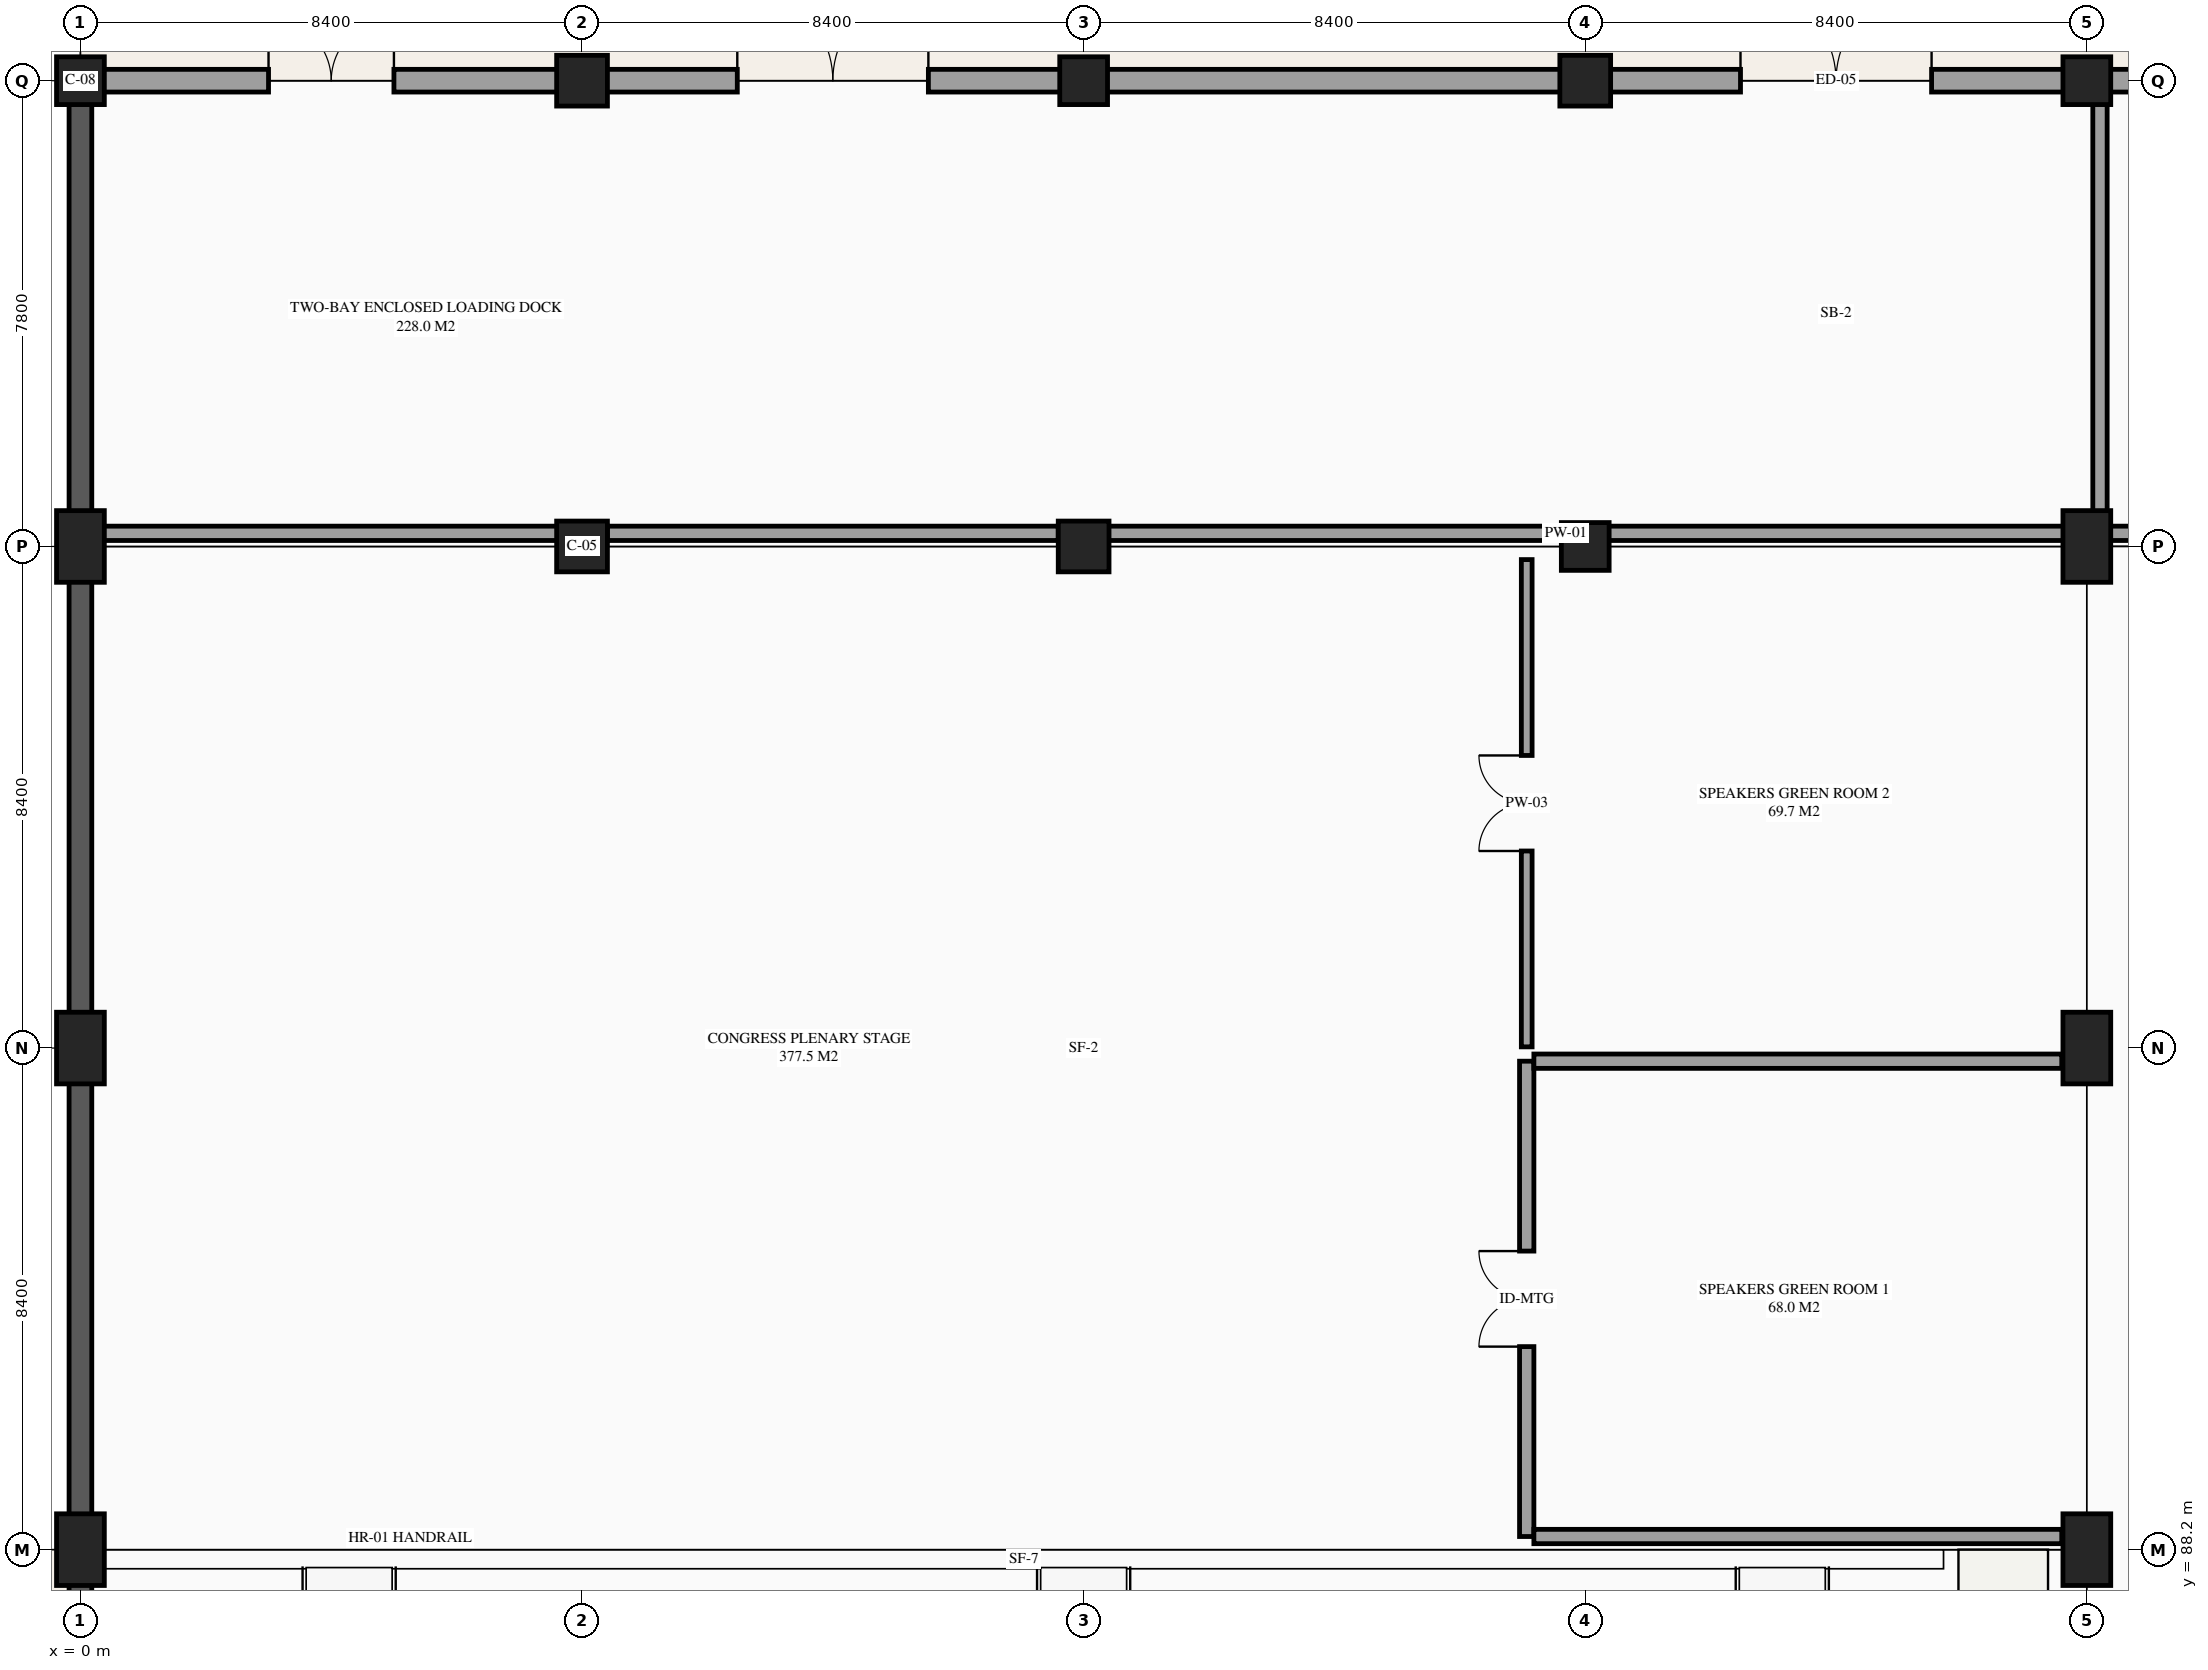
"""IFC4 building model, lengths in metres.
Left out: names, types, materials, properties, quantities, classifications, styles, units other than length and angle.
Written with IfcOpenShell. Run it as: python <this file> out.ifc"""

import sys

from ifc_helpers import new_model, si_unit, direction, frame, frame_2d, origin, origin_2d, place, context, subcontext, project, spatial, rectangle, extrude, element, fill, save


model = new_model("IFC4")
c1 = context("Model", 3, precision=1e-05, world=origin(), true_north=direction((0.0, 1.0)))
c2 = subcontext(c1, "Body", "Model", "MODEL_VIEW")
j1 = project(units=[si_unit("LENGTHUNIT", "METRE"), si_unit("PLANEANGLEUNIT", "RADIAN")], contexts=[c1])
p1 = place(None, origin())
s1 = spatial("IfcSite", under=j1, at=p1, CompositionType="ELEMENT")
p2 = place(p1, origin())
s2 = spatial("IfcBuilding", under=s1, at=p2, CompositionType="ELEMENT")
p3 = place(p2, origin())
s3 = spatial("IfcBuildingStorey", under=s2, at=p3, CompositionType="ELEMENT", Elevation=0.0)
for number, where, z_axis, x_axis in (
    (1, (0.0, 88.2, 0.0), (0.0, 0.0, 1.0), (1.0, 0.0, 0.0)),
    (2, (0.0, 96.6, 0.0), (0.0, 0.0, 1.0), (1.0, 0.0, 0.0)),
    (3, (0.0, 105.0, 0.0), (0.0, 0.0, 1.0), (1.0, 0.0, 0.0)),
):
    element("IfcColumn", number, at=place(p3, frame(where, z_axis=z_axis, x_axis=x_axis)), inside=s3, PredefinedType="COLUMN", context=c2, shape_type="SweptSolid", body=[
        extrude(rectangle(XDim=0.8, YDim=1.2, at=origin_2d()), origin(), (0.0, 0.0, 1.0), 5.4),
    ])
p4 = place(p3, frame((0.0, 112.8, 0.0), z_axis=(0.0, 0.0, 1.0), x_axis=(1.0, 0.0, 0.0)))
e4 = element("IfcColumn", 4, at=p4, inside=s3, PredefinedType="COLUMN", context=c2, shape_type="SweptSolid", body=[
    extrude(rectangle(XDim=0.8, YDim=0.8, at=origin_2d()), origin(), (0.0, 0.0, 1.0), 5.4),
])
for number, where, z_axis, x_axis in (
    (5, (8.4, 105.0, 0.0), (0.0, 0.0, 1.0), (1.0, 0.0, 0.0)),
    (6, (8.4, 112.8, 0.0), (0.0, 0.0, 1.0), (1.0, 0.0, 0.0)),
    (7, (16.8, 105.0, 0.0), (0.0, 0.0, 1.0), (1.0, 0.0, 0.0)),
):
    element("IfcColumn", number, at=place(p3, frame(where, z_axis=z_axis, x_axis=x_axis)), inside=s3, PredefinedType="COLUMN", context=c2, shape_type="SweptSolid", body=[
        extrude(rectangle(XDim=0.85, YDim=0.85, at=origin_2d()), origin(), (0.0, 0.0, 1.0), 5.4),
    ])
for number, where, z_axis, x_axis in (
    (8, (16.8, 112.8, 0.0), (0.0, 0.0, 1.0), (1.0, 0.0, 0.0)),
    (9, (25.2, 105.0, 0.0), (0.0, 0.0, 1.0), (1.0, 0.0, 0.0)),
):
    element("IfcColumn", number, at=place(p3, frame(where, z_axis=z_axis, x_axis=x_axis)), inside=s3, PredefinedType="COLUMN", context=c2, shape_type="SweptSolid", body=[
        extrude(rectangle(XDim=0.8, YDim=0.8, at=origin_2d()), origin(), (0.0, 0.0, 1.0), 5.4),
    ])
p5 = place(p3, frame((25.2, 112.8, 0.0), z_axis=(0.0, 0.0, 1.0), x_axis=(1.0, 0.0, 0.0)))
e10 = element("IfcColumn", 10, at=p5, inside=s3, PredefinedType="COLUMN", context=c2, shape_type="SweptSolid", body=[
    extrude(rectangle(XDim=0.85, YDim=0.85, at=origin_2d()), origin(), (0.0, 0.0, 1.0), 5.4),
])
for number, where, z_axis, x_axis in (
    (11, (33.6, 88.2, 0.0), (0.0, 0.0, 1.0), (1.0, 0.0, 0.0)),
    (12, (33.6, 96.6, 0.0), (0.0, 0.0, 1.0), (1.0, 0.0, 0.0)),
    (13, (33.6, 105.0, 0.0), (0.0, 0.0, 1.0), (1.0, 0.0, 0.0)),
):
    element("IfcColumn", number, at=place(p3, frame(where, z_axis=z_axis, x_axis=x_axis)), inside=s3, PredefinedType="COLUMN", context=c2, shape_type="SweptSolid", body=[
        extrude(rectangle(XDim=0.8, YDim=1.2, at=origin_2d()), origin(), (0.0, 0.0, 1.0), 5.4),
    ])
p6 = place(p3, frame((33.6, 112.8, 0.0), z_axis=(0.0, 0.0, 1.0), x_axis=(1.0, 0.0, 0.0)))
e14 = element("IfcColumn", 14, at=p6, inside=s3, PredefinedType="COLUMN", context=c2, shape_type="SweptSolid", body=[
    extrude(rectangle(XDim=0.8, YDim=0.8, at=origin_2d()), origin(), (0.0, 0.0, 1.0), 5.4),
])
p7 = place(p3, frame((42.0, 112.8, 0.0), z_axis=(0.0, 0.0, 1.0), x_axis=(-1.0, 0.0, 0.0)))
e15 = element("IfcWall", 15, at=p7, inside=s3, PredefinedType="STANDARD", context=c2, shape_type="SweptSolid", body=[
    extrude(rectangle(XDim=8.4, YDim=0.38, at=frame_2d((4.2, 0.0))), origin(), (0.0, 0.0, 1.0), 5.4),
])
p8 = place(p3, frame((33.6, 112.8, 0.0), z_axis=(0.0, 0.0, 1.0), x_axis=(-1.0, 0.0, 0.0)))
e16 = element("IfcWall", 16, at=p8, inside=s3, PredefinedType="STANDARD", context=c2, shape_type="SweptSolid", body=[
    extrude(rectangle(XDim=8.4, YDim=0.38, at=frame_2d((4.2, 0.0))), origin(), (0.0, 0.0, 1.0), 4.44),
])
p9 = place(p8, frame((5.8, 0.0, 0.0), z_axis=(0.0, 0.0, 1.0), x_axis=(-1.0, 0.0, 0.0)))
e17 = element("IfcOpeningElement", 17, at=p9, cuts=e16, PredefinedType="OPENING", context=c2, shape_type="SweptSolid", body=[
    extrude(rectangle(XDim=3.2, YDim=3.0, at=frame_2d((1.6, 1.5))), frame((0.0, 0.2, 0.0), z_axis=(0.0, -1.0, 0.0), x_axis=(1.0, 0.0, 0.0)), (0.0, 0.0, 1.0), 0.4),
])
p10 = place(p3, frame((25.2, 112.8, 0.0), z_axis=(0.0, 0.0, 1.0), x_axis=(-1.0, 0.0, 0.0)))
e18 = element("IfcWall", 18, at=p10, inside=s3, PredefinedType="STANDARD", context=c2, shape_type="SweptSolid", body=[
    extrude(rectangle(XDim=8.4, YDim=0.38, at=frame_2d((4.2, 0.0))), origin(), (0.0, 0.0, 1.0), 4.456),
])
p11 = place(p3, frame((16.8, 112.8, 0.0), z_axis=(0.0, 0.0, 1.0), x_axis=(-1.0, 0.0, 0.0)))
e19 = element("IfcWall", 19, at=p11, inside=s3, PredefinedType="STANDARD", context=c2, shape_type="SweptSolid", body=[
    extrude(rectangle(XDim=8.4, YDim=0.38, at=frame_2d((4.2, 0.0))), origin(), (0.0, 0.0, 1.0), 4.83),
])
p12 = place(p11, frame((5.8, 0.0, 0.0), z_axis=(0.0, 0.0, 1.0), x_axis=(-1.0, 0.0, 0.0)))
e20 = element("IfcOpeningElement", 20, at=p12, cuts=e19, PredefinedType="OPENING", context=c2, shape_type="SweptSolid", body=[
    extrude(rectangle(XDim=3.2, YDim=3.0, at=frame_2d((1.6, 1.5))), frame((0.0, 0.2, 0.0), z_axis=(0.0, -1.0, 0.0), x_axis=(1.0, 0.0, 0.0)), (0.0, 0.0, 1.0), 0.4),
])
p13 = place(p3, frame((8.4, 112.8, 0.0), z_axis=(0.0, 0.0, 1.0), x_axis=(-1.0, 0.0, 0.0)))
e21 = element("IfcWall", 21, at=p13, inside=s3, PredefinedType="STANDARD", context=c2, shape_type="SweptSolid", body=[
    extrude(rectangle(XDim=8.4, YDim=0.38, at=frame_2d((4.2, 0.0))), origin(), (0.0, 0.0, 1.0), 4.39),
])
p14 = place(p13, frame((5.25, 0.0, 0.0), z_axis=(0.0, 0.0, 1.0), x_axis=(-1.0, 0.0, 0.0)))
e22 = element("IfcOpeningElement", 22, at=p14, cuts=e21, PredefinedType="OPENING", context=c2, shape_type="SweptSolid", body=[
    extrude(rectangle(XDim=2.1, YDim=2.4, at=frame_2d((1.05, 1.2))), frame((0.0, 0.2, 0.0), z_axis=(0.0, -1.0, 0.0), x_axis=(1.0, 0.0, 0.0)), (0.0, 0.0, 1.0), 0.4),
])
p15 = place(p3, frame((0.0, 112.8, 0.0), z_axis=(0.0, 0.0, 1.0), x_axis=(0.0, -1.0, 0.0)))
e23 = element("IfcWall", 23, at=p15, inside=s3, PredefinedType="STANDARD", context=c2, shape_type="SweptSolid", body=[
    extrude(rectangle(XDim=7.8, YDim=0.38, at=frame_2d((3.9, 0.0))), origin(), (0.0, 0.0, 1.0), 5.4),
])
p16 = place(p3, frame((0.0, 105.0, 0.0), z_axis=(0.0, 0.0, 1.0), x_axis=(0.0, -1.0, 0.0)))
e24 = element("IfcWall", 24, at=p16, inside=s3, PredefinedType="STANDARD", context=c2, shape_type="SweptSolid", body=[
    extrude(rectangle(XDim=8.4, YDim=0.38, at=frame_2d((4.2, 0.0))), origin(), (0.0, 0.0, 1.0), 5.4),
])
p17 = place(p3, frame((0.0, 96.6, 0.0), z_axis=(0.0, 0.0, 1.0), x_axis=(0.0, -1.0, 0.0)))
e25 = element("IfcWall", 25, at=p17, inside=s3, PredefinedType="STANDARD", context=c2, shape_type="SweptSolid", body=[
    extrude(rectangle(XDim=8.4, YDim=0.38, at=frame_2d((4.2, 0.0))), origin(), (0.0, 0.0, 1.0), 5.4),
])
p18 = place(p3, frame((0.0, 88.2, 0.0), z_axis=(0.0, 0.0, 1.0), x_axis=(0.0, -1.0, 0.0)))
e26 = element("IfcWall", 26, at=p18, inside=s3, PredefinedType="STANDARD", context=c2, shape_type="SweptSolid", body=[
    extrude(rectangle(XDim=8.4, YDim=0.38, at=frame_2d((4.2, 0.0))), origin(), (0.0, 0.0, 1.0), 5.4),
])
p19 = place(p3, frame((16.375, 105.22, 0.0), z_axis=(0.0, 0.0, 1.0), x_axis=(1.0, 0.0, 0.0)))
e27 = element("IfcWall", 27, at=p19, inside=s3, PredefinedType="PARTITIONING", context=c2, shape_type="SweptSolid", body=[
    extrude(rectangle(XDim=17.005, YDim=0.24, at=frame_2d((8.502, 0.0))), origin(), (0.0, 0.0, 1.0), 5.135),
])
p20 = place(p3, frame((33.82, 105.34, 0.0), z_axis=(0.0, 0.0, 1.0), x_axis=(0.0, 1.0, 0.0)))
e28 = element("IfcWall", 28, at=p20, inside=s3, PredefinedType="PARTITIONING", context=c2, shape_type="SweptSolid", body=[
    extrude(rectangle(XDim=7.27, YDim=0.24, at=frame_2d((3.635, 0.0))), origin(), (0.0, 0.0, 1.0), 4.34),
])
p21 = place(p3, frame((24.22, 88.42, 0.8), z_axis=(0.0, 0.0, 1.0), x_axis=(0.0, 1.0, 0.0)))
e29 = element("IfcWall", 29, at=p21, inside=s3, PredefinedType="PARTITIONING", context=c2, shape_type="SweptSolid", body=[
    extrude(rectangle(XDim=7.96, YDim=0.24, at=frame_2d((3.98, 0.0))), origin(), (0.0, 0.0, 1.0), 4.335),
])
p22 = place(p21, frame((3.18, 0.0, 0.0)))
e30 = element("IfcOpeningElement", 30, at=p22, cuts=e29, PredefinedType="OPENING", context=c2, shape_type="SweptSolid", body=[
    extrude(rectangle(XDim=1.6, YDim=2.25, at=frame_2d((0.8, 1.125))), frame((0.0, 0.13, 0.0), z_axis=(0.0, -1.0, 0.0), x_axis=(1.0, 0.0, 0.0)), (0.0, 0.0, 1.0), 0.26),
])
for number, where, z_axis, x_axis in (
    (31, (24.34, 88.42, 0.8), (0.0, 0.0, 1.0), (1.0, 0.0, 0.0)),
    (32, (24.34, 96.38, 0.8), (0.0, 0.0, 1.0), (1.0, 0.0, 0.0)),
):
    element("IfcWall", number, at=place(p3, frame(where, z_axis=z_axis, x_axis=x_axis)), inside=s3, PredefinedType="PARTITIONING", context=c2, shape_type="SweptSolid", body=[
        extrude(rectangle(XDim=8.84, YDim=0.24, at=frame_2d((4.42, 0.0))), origin(), (0.0, 0.0, 1.0), 4.335),
    ])
p23 = place(p3, frame((24.22, 96.62, 0.8), z_axis=(0.0, 0.0, 1.0), x_axis=(0.0, 1.0, 0.0)))
e33 = element("IfcWall", 33, at=p23, inside=s3, PredefinedType="PARTITIONING", context=c2, shape_type="SweptSolid", body=[
    extrude(rectangle(XDim=8.16, YDim=0.18, at=frame_2d((4.08, 0.0))), origin(), (0.0, 0.0, 1.0), 4.335),
])
p24 = place(p23, frame((3.28, 0.0, 0.0)))
e34 = element("IfcOpeningElement", 34, at=p24, cuts=e33, PredefinedType="OPENING", context=c2, shape_type="SweptSolid", body=[
    extrude(rectangle(XDim=1.6, YDim=2.25, at=frame_2d((0.8, 1.125))), frame((0.0, 0.1, 0.0), z_axis=(0.0, -1.0, 0.0), x_axis=(1.0, 0.0, 0.0)), (0.0, 0.0, 1.0), 0.2),
])
p25 = place(p3, frame((0.19, 105.22, 0.0), z_axis=(0.0, 0.0, 1.0), x_axis=(1.0, 0.0, 0.0)))
e35 = element("IfcWall", 35, at=p25, inside=s3, PredefinedType="PARTITIONING", context=c2, shape_type="SweptSolid", body=[
    extrude(rectangle(XDim=8.635, YDim=0.24, at=frame_2d((4.317, 0.0))), origin(), (0.0, 0.0, 1.0), 5.135),
])
p26 = place(p3, frame((8.825, 105.22, 0.0), z_axis=(0.0, 0.0, 1.0), x_axis=(1.0, 0.0, 0.0)))
e36 = element("IfcWall", 36, at=p26, inside=s3, PredefinedType="PARTITIONING", context=c2, shape_type="SweptSolid", body=[
    extrude(rectangle(XDim=7.55, YDim=0.24, at=frame_2d((3.775, 0.0))), origin(), (0.0, 0.0, 1.0), 4.49),
])
p27 = place(p3, frame((33.82, 105.22, 0.0), z_axis=(0.0, 0.0, 1.0), x_axis=(1.0, 0.0, 0.0)))
e37 = element("IfcWall", 37, at=p27, inside=s3, PredefinedType="PARTITIONING", context=c2, shape_type="SweptSolid", body=[
    extrude(rectangle(XDim=7.755, YDim=0.24, at=frame_2d((3.877, 0.0))), origin(), (0.0, 0.0, 1.0), 4.19),
])
p28 = place(p9, origin())
e38 = element("IfcDoor", 38, at=p28, inside=s3, OperationType="DOUBLE_DOOR_SINGLE_SWING", PredefinedType="DOOR", context=c2, shape_type="SweptSolid", body=[
    extrude(rectangle(XDim=3.2, YDim=3.0, at=frame_2d((1.6, 1.5))), frame((0.0, 0.025, 0.0), z_axis=(0.0, -1.0, 0.0), x_axis=(1.0, 0.0, 0.0)), (0.0, 0.0, 1.0), 0.05),
])
fill(e17, e38)
p29 = place(p12, origin())
e39 = element("IfcDoor", 39, at=p29, inside=s3, OperationType="DOUBLE_DOOR_SINGLE_SWING", PredefinedType="DOOR", context=c2, shape_type="SweptSolid", body=[
    extrude(rectangle(XDim=3.2, YDim=3.0, at=frame_2d((1.6, 1.5))), frame((0.0, 0.025, 0.0), z_axis=(0.0, -1.0, 0.0), x_axis=(1.0, 0.0, 0.0)), (0.0, 0.0, 1.0), 0.05),
])
fill(e20, e39)
p30 = place(p14, origin())
e40 = element("IfcDoor", 40, at=p30, inside=s3, OperationType="DOUBLE_DOOR_SINGLE_SWING", PredefinedType="DOOR", context=c2, shape_type="SweptSolid", body=[
    extrude(rectangle(XDim=2.1, YDim=2.4, at=frame_2d((1.05, 1.2))), frame((0.0, 0.025, 0.0), z_axis=(0.0, -1.0, 0.0), x_axis=(1.0, 0.0, 0.0)), (0.0, 0.0, 1.0), 0.05),
])
fill(e22, e40)
p31 = place(p22, origin())
e41 = element("IfcDoor", 41, at=p31, inside=s3, OperationType="DOUBLE_DOOR_SINGLE_SWING", PredefinedType="DOOR", context=c2, shape_type="SweptSolid", body=[
    extrude(rectangle(XDim=1.6, YDim=2.25, at=frame_2d((0.8, 1.125))), frame((0.0, 0.025, 0.0), z_axis=(0.0, -1.0, 0.0), x_axis=(1.0, 0.0, 0.0)), (0.0, 0.0, 1.0), 0.05),
])
fill(e30, e41)
p32 = place(p24, origin())
e42 = element("IfcDoor", 42, at=p32, inside=s3, OperationType="DOUBLE_DOOR_SINGLE_SWING", PredefinedType="DOOR", context=c2, shape_type="SweptSolid", body=[
    extrude(rectangle(XDim=1.6, YDim=2.25, at=frame_2d((0.8, 1.125))), frame((0.0, 0.025, 0.0), z_axis=(0.0, -1.0, 0.0), x_axis=(1.0, 0.0, 0.0)), (0.0, 0.0, 1.0), 0.05),
])
fill(e34, e42)
save(model, sys.argv[1])
